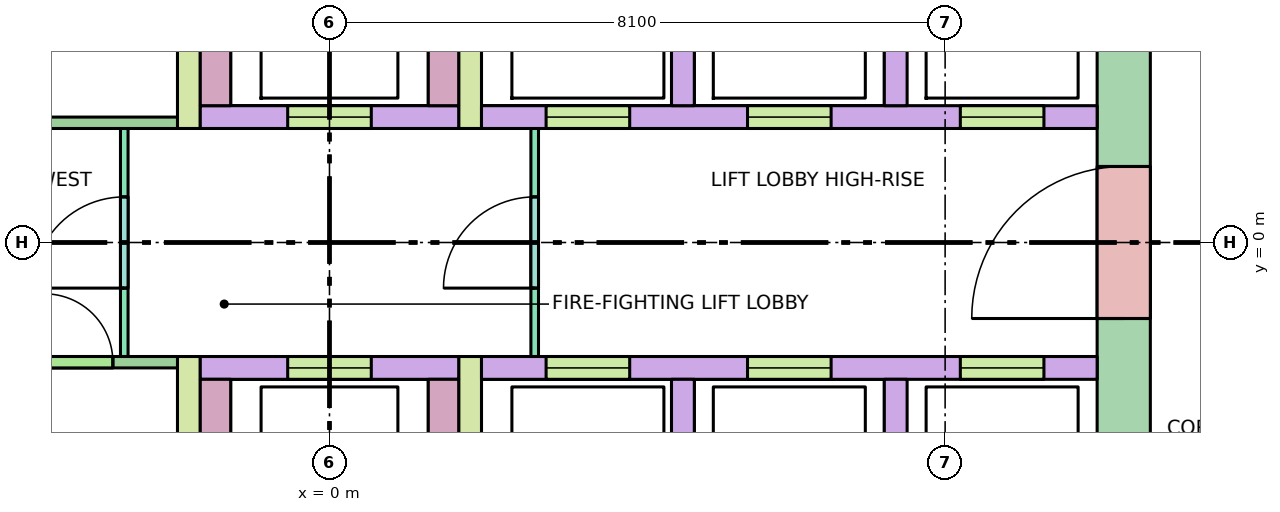
"""IFC4 building model, lengths in metres.
Left out: names, types, materials, properties, quantities, classifications, styles, units other than length and angle.
Written with IfcOpenShell. Run it as: python <this file> out.ifc"""

import sys

from ifc_helpers import new_model, si_unit, direction, frame, frame_2d, origin, place, context, subcontext, project, spatial, rectangle, extrude, element, fill, save


model = new_model("IFC4")
c1 = context("Model", 3, precision=1e-05, world=origin(), true_north=direction((0.0, 1.0)))
c2 = subcontext(c1, "Body", "Model", "MODEL_VIEW")
j1 = project(units=[si_unit("LENGTHUNIT", "METRE"), si_unit("PLANEANGLEUNIT", "RADIAN")], contexts=[c1])
p1 = place(None, origin())
s1 = spatial("IfcSite", under=j1, at=p1, CompositionType="ELEMENT")
p2 = place(p1, origin())
s2 = spatial("IfcBuilding", under=s1, at=p2, CompositionType="ELEMENT")
p3 = place(p2, frame((0.0, 0.0, 176.4)))
s3 = spatial("IfcBuildingStorey", under=s2, at=p3, CompositionType="ELEMENT", Elevation=176.4)
p4 = place(p3, frame((10.45, -5.13, -0.28), z_axis=(0.0, 0.0, 1.0), x_axis=(0.0, 1.0, 0.0)))
e1 = element("IfcWall", 1, at=p4, inside=s3, PredefinedType="SHEAR", context=c2, shape_type="SweptSolid", body=[
    extrude(rectangle(XDim=10.26, YDim=0.7, at=frame_2d((5.13, 0.0))), origin(), (0.0, 0.0, 1.0), 3.7),
])
p5 = place(p4, frame((4.13, 0.0, 0.28)))
e2 = element("IfcOpeningElement", 2, at=p5, cuts=e1, PredefinedType="OPENING", context=c2, shape_type="SweptSolid", body=[
    extrude(rectangle(XDim=2.0, YDim=2.1, at=frame_2d((1.0, 1.05))), frame((0.0, 0.36, 0.0), z_axis=(0.0, -1.0, 0.0), x_axis=(1.0, 0.0, 0.0)), (0.0, 0.0, 1.0), 0.72),
])
p6 = place(p3, frame((2.0, 1.65, 0.0), z_axis=(0.0, 0.0, 1.0), x_axis=(1.0, 0.0, 0.0)))
e3 = element("IfcWall", 3, at=p6, inside=s3, PredefinedType="SOLIDWALL", context=c2, shape_type="SweptSolid", body=[
    extrude(rectangle(XDim=8.1, YDim=0.3, at=frame_2d((4.05, 0.0))), origin(), (0.0, 0.0, 1.0), 3.42),
])
p7 = place(p6, frame((0.85, 0.0, 0.0)))
e4 = element("IfcOpeningElement", 4, at=p7, cuts=e3, PredefinedType="OPENING", context=c2, shape_type="SweptSolid", body=[
    extrude(rectangle(XDim=1.1, YDim=2.1, at=frame_2d((0.55, 1.05))), frame((0.0, 0.16, 0.0), z_axis=(0.0, -1.0, 0.0), x_axis=(1.0, 0.0, 0.0)), (0.0, 0.0, 1.0), 0.32),
])
p8 = place(p6, frame((3.5, 0.0, 0.0)))
e5 = element("IfcOpeningElement", 5, at=p8, cuts=e3, PredefinedType="OPENING", context=c2, shape_type="SweptSolid", body=[
    extrude(rectangle(XDim=1.1, YDim=2.1, at=frame_2d((0.55, 1.05))), frame((0.0, 0.16, 0.0), z_axis=(0.0, -1.0, 0.0), x_axis=(1.0, 0.0, 0.0)), (0.0, 0.0, 1.0), 0.32),
])
p9 = place(p6, frame((6.3, 0.0, 0.0)))
e6 = element("IfcOpeningElement", 6, at=p9, cuts=e3, PredefinedType="OPENING", context=c2, shape_type="SweptSolid", body=[
    extrude(rectangle(XDim=1.1, YDim=2.1, at=frame_2d((0.55, 1.05))), frame((0.0, 0.16, 0.0), z_axis=(0.0, -1.0, 0.0), x_axis=(1.0, 0.0, 0.0)), (0.0, 0.0, 1.0), 0.32),
])
p10 = place(p3, frame((2.0, -1.65, 0.0), z_axis=(0.0, 0.0, 1.0), x_axis=(1.0, 0.0, 0.0)))
e7 = element("IfcWall", 7, at=p10, inside=s3, PredefinedType="SOLIDWALL", context=c2, shape_type="SweptSolid", body=[
    extrude(rectangle(XDim=8.1, YDim=0.3, at=frame_2d((4.05, 0.0))), origin(), (0.0, 0.0, 1.0), 3.42),
])
p11 = place(p10, frame((0.85, 0.0, 0.0)))
e8 = element("IfcOpeningElement", 8, at=p11, cuts=e7, PredefinedType="OPENING", context=c2, shape_type="SweptSolid", body=[
    extrude(rectangle(XDim=1.1, YDim=2.1, at=frame_2d((0.55, 1.05))), frame((0.0, 0.16, 0.0), z_axis=(0.0, -1.0, 0.0), x_axis=(1.0, 0.0, 0.0)), (0.0, 0.0, 1.0), 0.32),
])
p12 = place(p10, frame((3.5, 0.0, 0.0)))
e9 = element("IfcOpeningElement", 9, at=p12, cuts=e7, PredefinedType="OPENING", context=c2, shape_type="SweptSolid", body=[
    extrude(rectangle(XDim=1.1, YDim=2.1, at=frame_2d((0.55, 1.05))), frame((0.0, 0.16, 0.0), z_axis=(0.0, -1.0, 0.0), x_axis=(1.0, 0.0, 0.0)), (0.0, 0.0, 1.0), 0.32),
])
p13 = place(p10, frame((6.3, 0.0, 0.0)))
e10 = element("IfcOpeningElement", 10, at=p13, cuts=e7, PredefinedType="OPENING", context=c2, shape_type="SweptSolid", body=[
    extrude(rectangle(XDim=1.1, YDim=2.1, at=frame_2d((0.55, 1.05))), frame((0.0, 0.16, 0.0), z_axis=(0.0, -1.0, 0.0), x_axis=(1.0, 0.0, 0.0)), (0.0, 0.0, 1.0), 0.32),
])
for number, where, z_axis, x_axis in (
    (11, (4.65, 1.8, 0.0), (0.0, 0.0, 1.0), (0.0, 1.0, 0.0)),
    (12, (4.65, -4.2, 0.0), (0.0, 0.0, 1.0), (0.0, 1.0, 0.0)),
    (13, (7.45, 1.8, 0.0), (0.0, 0.0, 1.0), (0.0, 1.0, 0.0)),
    (14, (7.45, -4.2, 0.0), (0.0, 0.0, 1.0), (0.0, 1.0, 0.0)),
):
    element("IfcWall", number, at=place(p3, frame(where, z_axis=z_axis, x_axis=x_axis)), inside=s3, PredefinedType="SOLIDWALL", context=c2, shape_type="SweptSolid", body=[
        extrude(rectangle(XDim=2.4, YDim=0.3, at=frame_2d((1.2, 0.0))), origin(), (0.0, 0.0, 1.0), 3.42),
    ])
for number, where, z_axis, x_axis in (
    (15, (-1.85, 1.5, 0.0), (0.0, 0.0, 1.0), (0.0, 1.0, 0.0)),
    (16, (-1.85, -8.1, 0.0), (0.0, 0.0, 1.0), (0.0, 1.0, 0.0)),
    (17, (1.85, 1.5, 0.0), (0.0, 0.0, 1.0), (0.0, 1.0, 0.0)),
    (18, (1.85, -8.1, 0.0), (0.0, 0.0, 1.0), (0.0, 1.0, 0.0)),
):
    element("IfcWall", number, at=place(p3, frame(where, z_axis=z_axis, x_axis=x_axis)), inside=s3, PredefinedType="SHEAR", context=c2, shape_type="SweptSolid", body=[
        extrude(rectangle(XDim=6.6, YDim=0.3, at=frame_2d((3.3, 0.0))), origin(), (0.0, 0.0, 1.0), 3.42),
    ])
p14 = place(p3, frame((-1.7, 1.65, 0.0), z_axis=(0.0, 0.0, 1.0), x_axis=(1.0, 0.0, 0.0)))
e19 = element("IfcWall", 19, at=p14, inside=s3, PredefinedType="SOLIDWALL", context=c2, shape_type="SweptSolid", body=[
    extrude(rectangle(XDim=3.4, YDim=0.3, at=frame_2d((1.7, 0.0))), origin(), (0.0, 0.0, 1.0), 3.42),
])
p15 = place(p14, frame((1.15, 0.0, 0.0)))
e20 = element("IfcOpeningElement", 20, at=p15, cuts=e19, PredefinedType="OPENING", context=c2, shape_type="SweptSolid", body=[
    extrude(rectangle(XDim=1.1, YDim=2.1, at=frame_2d((0.55, 1.05))), frame((0.0, 0.16, 0.0), z_axis=(0.0, -1.0, 0.0), x_axis=(1.0, 0.0, 0.0)), (0.0, 0.0, 1.0), 0.32),
])
p16 = place(p3, frame((-1.7, -1.65, 0.0), z_axis=(0.0, 0.0, 1.0), x_axis=(1.0, 0.0, 0.0)))
e21 = element("IfcWall", 21, at=p16, inside=s3, PredefinedType="SOLIDWALL", context=c2, shape_type="SweptSolid", body=[
    extrude(rectangle(XDim=3.4, YDim=0.3, at=frame_2d((1.7, 0.0))), origin(), (0.0, 0.0, 1.0), 3.42),
])
p17 = place(p16, frame((1.15, 0.0, 0.0)))
e22 = element("IfcOpeningElement", 22, at=p17, cuts=e21, PredefinedType="OPENING", context=c2, shape_type="SweptSolid", body=[
    extrude(rectangle(XDim=1.1, YDim=2.1, at=frame_2d((0.55, 1.05))), frame((0.0, 0.16, 0.0), z_axis=(0.0, -1.0, 0.0), x_axis=(1.0, 0.0, 0.0)), (0.0, 0.0, 1.0), 0.32),
])
for number, where, z_axis, x_axis in (
    (23, (-1.5, 1.8, 0.0), (0.0, 0.0, 1.0), (0.0, 1.0, 0.0)),
    (24, (-1.5, -4.8, 0.0), (0.0, 0.0, 1.0), (0.0, 1.0, 0.0)),
    (25, (1.5, 1.8, 0.0), (0.0, 0.0, 1.0), (0.0, 1.0, 0.0)),
    (26, (1.5, -4.8, 0.0), (0.0, 0.0, 1.0), (0.0, 1.0, 0.0)),
):
    element("IfcWall", number, at=place(p3, frame(where, z_axis=z_axis, x_axis=x_axis)), inside=s3, PredefinedType="SOLIDWALL", context=c2, shape_type="SweptSolid", body=[
        extrude(rectangle(XDim=3.0, YDim=0.4, at=frame_2d((1.5, 0.0))), origin(), (0.0, 0.0, 1.0), 3.42),
    ])
p18 = place(p3, frame((-2.7, -1.5, 0.0), z_axis=(0.0, 0.0, 1.0), x_axis=(0.0, 1.0, 0.0)))
e27 = element("IfcWall", 27, at=p18, inside=s3, PredefinedType="PARTITIONING", context=c2, shape_type="SweptSolid", body=[
    extrude(rectangle(XDim=3.0, YDim=0.1, at=frame_2d((1.5, 0.0))), origin(), (0.0, 0.0, 1.0), 3.42),
])
p19 = place(p18, frame((0.9, 0.0, 0.0)))
e28 = element("IfcOpeningElement", 28, at=p19, cuts=e27, PredefinedType="OPENING", context=c2, shape_type="SweptSolid", body=[
    extrude(rectangle(XDim=1.2, YDim=2.1, at=frame_2d((0.6, 1.05))), frame((0.0, 0.06, 0.0), z_axis=(0.0, -1.0, 0.0), x_axis=(1.0, 0.0, 0.0)), (0.0, 0.0, 1.0), 0.12),
])
p20 = place(p3, frame((2.7, -1.5, 0.0), z_axis=(0.0, 0.0, 1.0), x_axis=(0.0, 1.0, 0.0)))
e29 = element("IfcWall", 29, at=p20, inside=s3, PredefinedType="PARTITIONING", context=c2, shape_type="SweptSolid", body=[
    extrude(rectangle(XDim=3.0, YDim=0.1, at=frame_2d((1.5, 0.0))), origin(), (0.0, 0.0, 1.0), 3.42),
])
p21 = place(p20, frame((0.9, 0.0, 0.0)))
e30 = element("IfcOpeningElement", 30, at=p21, cuts=e29, PredefinedType="OPENING", context=c2, shape_type="SweptSolid", body=[
    extrude(rectangle(XDim=1.2, YDim=2.1, at=frame_2d((0.6, 1.05))), frame((0.0, 0.06, 0.0), z_axis=(0.0, -1.0, 0.0), x_axis=(1.0, 0.0, 0.0)), (0.0, 0.0, 1.0), 0.12),
])
p22 = place(p3, frame((-10.1, 1.575, 0.0), z_axis=(0.0, 0.0, 1.0), x_axis=(1.0, 0.0, 0.0)))
e31 = element("IfcWall", 31, at=p22, inside=s3, PredefinedType="PARTITIONING", context=c2, shape_type="SweptSolid", body=[
    extrude(rectangle(XDim=8.1, YDim=0.15, at=frame_2d((4.05, 0.0))), origin(), (0.0, 0.0, 1.0), 3.42),
])
p23 = place(p22, frame((0.941, 0.0, 0.0)))
e32 = element("IfcOpeningElement", 32, at=p23, cuts=e31, PredefinedType="OPENING", context=c2, shape_type="SweptSolid", body=[
    extrude(rectangle(XDim=0.9, YDim=2.1, at=frame_2d((0.45, 1.05))), frame((0.0, 0.085, 0.0), z_axis=(0.0, -1.0, 0.0), x_axis=(1.0, 0.0, 0.0)), (0.0, 0.0, 1.0), 0.17),
])
p24 = place(p22, frame((5.066, 0.0, 0.0)))
e33 = element("IfcOpeningElement", 33, at=p24, cuts=e31, PredefinedType="OPENING", context=c2, shape_type="SweptSolid", body=[
    extrude(rectangle(XDim=0.9, YDim=2.1, at=frame_2d((0.45, 1.05))), frame((0.0, 0.085, 0.0), z_axis=(0.0, -1.0, 0.0), x_axis=(1.0, 0.0, 0.0)), (0.0, 0.0, 1.0), 0.17),
])
p25 = place(p3, frame((-10.1, -1.575, 0.0), z_axis=(0.0, 0.0, 1.0), x_axis=(1.0, 0.0, 0.0)))
e34 = element("IfcWall", 34, at=p25, inside=s3, PredefinedType="PARTITIONING", context=c2, shape_type="SweptSolid", body=[
    extrude(rectangle(XDim=8.1, YDim=0.15, at=frame_2d((4.05, 0.0))), origin(), (0.0, 0.0, 1.0), 3.42),
])
p26 = place(p25, frame((2.333, 0.0, 0.0)))
e35 = element("IfcOpeningElement", 35, at=p26, cuts=e34, PredefinedType="OPENING", context=c2, shape_type="SweptSolid", body=[
    extrude(rectangle(XDim=0.9, YDim=2.1, at=frame_2d((0.45, 1.05))), frame((0.0, 0.085, 0.0), z_axis=(0.0, -1.0, 0.0), x_axis=(1.0, 0.0, 0.0)), (0.0, 0.0, 1.0), 0.17),
])
p27 = place(p25, frame((6.35, 0.0, 0.0)))
e36 = element("IfcOpeningElement", 36, at=p27, cuts=e34, PredefinedType="OPENING", context=c2, shape_type="SweptSolid", body=[
    extrude(rectangle(XDim=0.9, YDim=2.1, at=frame_2d((0.45, 1.05))), frame((0.0, 0.085, 0.0), z_axis=(0.0, -1.0, 0.0), x_axis=(1.0, 0.0, 0.0)), (0.0, 0.0, 1.0), 0.17),
])
p28 = place(p7, origin())
e37 = element("IfcDoor", 37, at=p28, inside=s3, OperationType="DOUBLE_DOOR_SLIDING", PredefinedType="DOOR", context=c2, shape_type="SweptSolid", body=[
    extrude(rectangle(XDim=1.1, YDim=2.1, at=frame_2d((0.55, 1.05))), frame((0.0, 0.025, 0.0), z_axis=(0.0, -1.0, 0.0), x_axis=(1.0, 0.0, 0.0)), (0.0, 0.0, 1.0), 0.05),
])
fill(e4, e37)
p29 = place(p8, origin())
e38 = element("IfcDoor", 38, at=p29, inside=s3, OperationType="DOUBLE_DOOR_SLIDING", PredefinedType="DOOR", context=c2, shape_type="SweptSolid", body=[
    extrude(rectangle(XDim=1.1, YDim=2.1, at=frame_2d((0.55, 1.05))), frame((0.0, 0.025, 0.0), z_axis=(0.0, -1.0, 0.0), x_axis=(1.0, 0.0, 0.0)), (0.0, 0.0, 1.0), 0.05),
])
fill(e5, e38)
p30 = place(p9, origin())
e39 = element("IfcDoor", 39, at=p30, inside=s3, OperationType="DOUBLE_DOOR_SLIDING", PredefinedType="DOOR", context=c2, shape_type="SweptSolid", body=[
    extrude(rectangle(XDim=1.1, YDim=2.1, at=frame_2d((0.55, 1.05))), frame((0.0, 0.025, 0.0), z_axis=(0.0, -1.0, 0.0), x_axis=(1.0, 0.0, 0.0)), (0.0, 0.0, 1.0), 0.05),
])
fill(e6, e39)
p31 = place(p11, origin())
e40 = element("IfcDoor", 40, at=p31, inside=s3, OperationType="DOUBLE_DOOR_SLIDING", PredefinedType="DOOR", context=c2, shape_type="SweptSolid", body=[
    extrude(rectangle(XDim=1.1, YDim=2.1, at=frame_2d((0.55, 1.05))), frame((0.0, 0.025, 0.0), z_axis=(0.0, -1.0, 0.0), x_axis=(1.0, 0.0, 0.0)), (0.0, 0.0, 1.0), 0.05),
])
fill(e8, e40)
p32 = place(p12, origin())
e41 = element("IfcDoor", 41, at=p32, inside=s3, OperationType="DOUBLE_DOOR_SLIDING", PredefinedType="DOOR", context=c2, shape_type="SweptSolid", body=[
    extrude(rectangle(XDim=1.1, YDim=2.1, at=frame_2d((0.55, 1.05))), frame((0.0, 0.025, 0.0), z_axis=(0.0, -1.0, 0.0), x_axis=(1.0, 0.0, 0.0)), (0.0, 0.0, 1.0), 0.05),
])
fill(e9, e41)
p33 = place(p13, origin())
e42 = element("IfcDoor", 42, at=p33, inside=s3, OperationType="DOUBLE_DOOR_SLIDING", PredefinedType="DOOR", context=c2, shape_type="SweptSolid", body=[
    extrude(rectangle(XDim=1.1, YDim=2.1, at=frame_2d((0.55, 1.05))), frame((0.0, 0.025, 0.0), z_axis=(0.0, -1.0, 0.0), x_axis=(1.0, 0.0, 0.0)), (0.0, 0.0, 1.0), 0.05),
])
fill(e10, e42)
p34 = place(p15, origin())
e43 = element("IfcDoor", 43, at=p34, inside=s3, OperationType="DOUBLE_DOOR_SLIDING", PredefinedType="DOOR", context=c2, shape_type="SweptSolid", body=[
    extrude(rectangle(XDim=1.1, YDim=2.1, at=frame_2d((0.55, 1.05))), frame((0.0, 0.025, 0.0), z_axis=(0.0, -1.0, 0.0), x_axis=(1.0, 0.0, 0.0)), (0.0, 0.0, 1.0), 0.05),
])
fill(e20, e43)
p35 = place(p17, origin())
e44 = element("IfcDoor", 44, at=p35, inside=s3, OperationType="DOUBLE_DOOR_SLIDING", PredefinedType="DOOR", context=c2, shape_type="SweptSolid", body=[
    extrude(rectangle(XDim=1.1, YDim=2.1, at=frame_2d((0.55, 1.05))), frame((0.0, 0.025, 0.0), z_axis=(0.0, -1.0, 0.0), x_axis=(1.0, 0.0, 0.0)), (0.0, 0.0, 1.0), 0.05),
])
fill(e22, e44)
p36 = place(p5, origin())
e45 = element("IfcDoor", 45, at=p36, inside=s3, OperationType="DOUBLE_DOOR_SINGLE_SWING", PredefinedType="DOOR", context=c2, shape_type="SweptSolid", body=[
    extrude(rectangle(XDim=2.0, YDim=2.1, at=frame_2d((1.0, 1.05))), frame((0.0, 0.025, 0.0), z_axis=(0.0, -1.0, 0.0), x_axis=(1.0, 0.0, 0.0)), (0.0, 0.0, 1.0), 0.05),
])
fill(e2, e45)
p37 = place(p19, origin())
e46 = element("IfcDoor", 46, at=p37, inside=s3, OperationType="SINGLE_SWING_LEFT", PredefinedType="DOOR", context=c2, shape_type="SweptSolid", body=[
    extrude(rectangle(XDim=1.2, YDim=2.1, at=frame_2d((0.6, 1.05))), frame((0.0, 0.025, 0.0), z_axis=(0.0, -1.0, 0.0), x_axis=(1.0, 0.0, 0.0)), (0.0, 0.0, 1.0), 0.05),
])
fill(e28, e46)
p38 = place(p21, origin())
e47 = element("IfcDoor", 47, at=p38, inside=s3, OperationType="SINGLE_SWING_LEFT", PredefinedType="DOOR", context=c2, shape_type="SweptSolid", body=[
    extrude(rectangle(XDim=1.2, YDim=2.1, at=frame_2d((0.6, 1.05))), frame((0.0, 0.025, 0.0), z_axis=(0.0, -1.0, 0.0), x_axis=(1.0, 0.0, 0.0)), (0.0, 0.0, 1.0), 0.05),
])
fill(e30, e47)
p39 = place(p27, origin())
e48 = element("IfcDoor", 48, at=p39, inside=s3, OperationType="SINGLE_SWING_LEFT", PredefinedType="DOOR", context=c2, shape_type="SweptSolid", body=[
    extrude(rectangle(XDim=0.9, YDim=2.1, at=frame_2d((0.45, 1.05))), frame((0.0, 0.025, 0.0), z_axis=(0.0, -1.0, 0.0), x_axis=(1.0, 0.0, 0.0)), (0.0, 0.0, 1.0), 0.05),
])
fill(e36, e48)
save(model, sys.argv[1])
